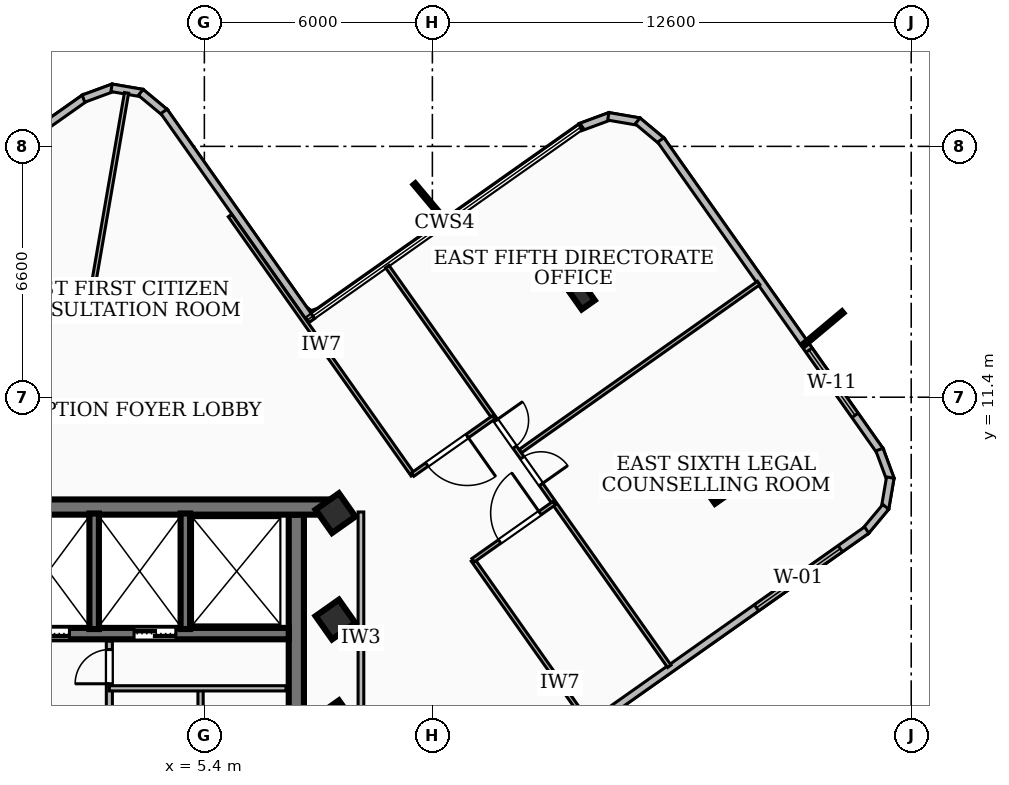
"""IFC4 building model, lengths in metres.
Left out: names, types, materials, properties, quantities, classifications, styles, units other than length and angle.
Written with IfcOpenShell. Run it as: python <this file> out.ifc"""

import sys

from ifc_helpers import new_model, si_unit, direction, frame, frame_2d, origin, origin_2d, place, context, subcontext, project, spatial, rectangle, i_section, extrude, element, fill, save


model = new_model("IFC4")
c1 = context("Model", 3, precision=1e-05, world=origin(), true_north=direction((0.0, 1.0)))
c2 = subcontext(c1, "Body", "Model", "MODEL_VIEW")
j1 = project(units=[si_unit("LENGTHUNIT", "METRE"), si_unit("PLANEANGLEUNIT", "RADIAN")], contexts=[c1])
p1 = place(None, origin())
s1 = spatial("IfcSite", under=j1, at=p1, CompositionType="ELEMENT")
p2 = place(p1, origin())
s2 = spatial("IfcBuilding", under=s1, at=p2, CompositionType="ELEMENT")
p3 = place(p2, frame((0.0, 0.0, 225.72)))
s3 = spatial("IfcBuildingStorey", under=s2, at=p3, CompositionType="ELEMENT", Elevation=225.72)
p4 = place(p3, frame((-8.78, 8.51, 0.0), z_axis=(0.0, 0.0, 1.0), x_axis=(1.0, 0.0, 0.0)))
e1 = element("IfcWall", 1, at=p4, inside=s3, PredefinedType="SHEAR", context=c2, shape_type="SweptSolid", body=[
    extrude(rectangle(XDim=17.56, YDim=0.4, at=frame_2d((8.78, 0.0))), origin(), (0.0, 0.0, 1.0), 3.14),
])
p5 = place(p3, frame((7.82, 8.31, 0.0), z_axis=(0.0, 0.0, 1.0), x_axis=(0.0, -1.0, 0.0)))
e2 = element("IfcWall", 2, at=p5, inside=s3, PredefinedType="SHEAR", context=c2, shape_type="SweptSolid", body=[
    extrude(rectangle(XDim=6.36, YDim=0.4, at=frame_2d((3.18, 0.0))), origin(), (0.0, 0.0, 1.0), 3.14),
])
p6 = place(p3, frame((7.62, 5.18, 0.0), z_axis=(0.0, 0.0, 1.0), x_axis=(-1.0, 0.0, 0.0)))
e3 = element("IfcWall", 3, at=p6, inside=s3, PredefinedType="SOLIDWALL", context=c2, shape_type="SweptSolid", body=[
    extrude(rectangle(XDim=15.24, YDim=0.3, at=frame_2d((7.62, 0.0))), origin(), (0.0, 0.0, 1.0), 3.14),
])
p7 = place(p6, frame((5.77, 0.0, 0.0)))
e4 = element("IfcOpeningElement", 4, at=p7, cuts=e3, PredefinedType="OPENING", context=c2, shape_type="SweptSolid", body=[
    extrude(rectangle(XDim=1.1, YDim=2.15, at=frame_2d((0.55, 1.075))), frame((0.0, 0.16, 0.0), z_axis=(0.0, -1.0, 0.0), x_axis=(1.0, 0.0, 0.0)), (0.0, 0.0, 1.0), 0.32),
])
p8 = place(p6, frame((2.97, 0.0, 0.0)))
e5 = element("IfcOpeningElement", 5, at=p8, cuts=e3, PredefinedType="OPENING", context=c2, shape_type="SweptSolid", body=[
    extrude(rectangle(XDim=1.1, YDim=2.15, at=frame_2d((0.55, 1.075))), frame((0.0, 0.16, 0.0), z_axis=(0.0, -1.0, 0.0), x_axis=(1.0, 0.0, 0.0)), (0.0, 0.0, 1.0), 0.32),
])
p9 = place(p6, frame((7.97, 0.0, 0.0)))
e6 = element("IfcOpeningElement", 6, at=p9, cuts=e3, PredefinedType="OPENING", context=c2, shape_type="SweptSolid", body=[
    extrude(rectangle(XDim=1.0, YDim=2.1, at=frame_2d((0.5, 1.05))), frame((0.0, 0.16, 0.0), z_axis=(0.0, -1.0, 0.0), x_axis=(1.0, 0.0, 0.0)), (0.0, 0.0, 1.0), 0.32),
])
for number, where, z_axis, x_axis in (
    (7, (2.5, 5.3, 0.0), (0.0, 0.0, 1.0), (0.0, 1.0, 0.0)),
    (8, (4.9, 5.3, 0.0), (0.0, 0.0, 1.0), (0.0, 1.0, 0.0)),
):
    element("IfcWall", number, at=place(p3, frame(where, z_axis=z_axis, x_axis=x_axis)), inside=s3, PredefinedType="SOLIDWALL", context=c2, shape_type="SweptSolid", body=[
        extrude(rectangle(XDim=3.04, YDim=0.25, at=frame_2d((1.52, 0.0))), origin(), (0.0, 0.0, 1.0), 3.14),
    ])
for number, where, z_axis, x_axis in (
    (9, (8.85, 2.9, 0.0), (0.0, 0.0, 1.0), (0.817, 0.576, 0.0)),
    (10, (8.85, 5.55, 0.0), (0.0, 0.0, 1.0), (0.817, 0.576, 0.0)),
    (11, (8.85, 8.35, 0.0), (0.0, 0.0, 1.0), (0.817, 0.576, 0.0)),
):
    element("IfcColumn", number, at=place(p3, frame(where, z_axis=z_axis, x_axis=x_axis)), inside=s3, PredefinedType="COLUMN", context=c2, shape_type="SweptSolid", body=[
        extrude(rectangle(XDim=0.75, YDim=0.75, at=origin_2d()), origin(), (0.0, 0.0, 1.0), 3.42),
    ])
for number, where, z_axis, x_axis in (
    (12, (18.741, 9.097, 0.0), (0.0, 0.0, 1.0), (0.817, 0.576, 0.0)),
    (13, (15.234, 14.209, 0.0), (0.0, 0.0, 1.0), (0.817, 0.576, 0.0)),
):
    element("IfcColumn", number, at=place(p3, frame(where, z_axis=z_axis, x_axis=x_axis)), inside=s3, PredefinedType="COLUMN", context=c2, shape_type="SweptSolid", body=[
        extrude(i_section(OverallWidth=0.418, OverallDepth=0.927, WebThickness=0.019, FlangeThickness=0.032, at=origin_2d()), origin(), (0.0, 0.0, 1.0), 3.42),
    ])
p10 = place(p3, frame((-2.919, 15.623, 0.0), z_axis=(0.0, 0.0, 1.0), x_axis=(0.817050016192, 0.576566796686, 0.0)))
e14 = element("IfcWall", 14, at=p10, inside=s3, PredefinedType="SOLIDWALL", context=c2, shape_type="SweptSolid", body=[
    extrude(rectangle(XDim=6.341, YDim=0.2, at=frame_2d((3.17, 0.0))), origin(), (0.0, 0.0, 1.0), 3.14),
])
p11 = place(p3, frame((2.219, 19.256, 0.0), z_axis=(0.0, 0.0, 1.0), x_axis=(0.938243551417, 0.345975487894, 0.0)))
e15 = element("IfcWall", 15, at=p11, inside=s3, PredefinedType="SOLIDWALL", context=c2, shape_type="SweptSolid", body=[
    extrude(rectangle(XDim=0.838, YDim=0.2, at=frame_2d((0.419, 0.0))), origin(), (0.0, 0.0, 1.0), 3.14),
])
p12 = place(p3, frame((2.957, 19.541, 0.0), z_axis=(0.0, 0.0, 1.0), x_axis=(0.985466949497, -0.169867275979, 0.0)))
e16 = element("IfcWall", 16, at=p12, inside=s3, PredefinedType="SOLIDWALL", context=c2, shape_type="SweptSolid", body=[
    extrude(rectangle(XDim=0.825, YDim=0.2, at=frame_2d((0.413, 0.0))), origin(), (0.0, 0.0, 1.0), 3.14),
])
p13 = place(p3, frame((3.726, 19.421, 0.0), z_axis=(0.0, 0.0, 1.0), x_axis=(0.768698761673, -0.639610986305, 0.0)))
e17 = element("IfcWall", 17, at=p13, inside=s3, PredefinedType="SOLIDWALL", context=c2, shape_type="SweptSolid", body=[
    extrude(rectangle(XDim=0.838, YDim=0.2, at=frame_2d((0.419, 0.0))), origin(), (0.0, 0.0, 1.0), 3.14),
])
p14 = place(p3, frame((4.337, 18.921, 0.0), z_axis=(0.0, 0.0, 1.0), x_axis=(0.576400163196, -0.817167578816, 0.0)))
e18 = element("IfcWall", 18, at=p14, inside=s3, PredefinedType="SOLIDWALL", context=c2, shape_type="SweptSolid", body=[
    extrude(rectangle(XDim=6.74, YDim=0.2, at=frame_2d((3.37, 0.0))), origin(), (0.0, 0.0, 1.0), 3.14),
])
p15 = place(p3, frame((15.292, 18.505, 0.0), z_axis=(0.0, 0.0, 1.0), x_axis=(0.938148911857, 0.346232030844, 0.0)))
e19 = element("IfcWall", 19, at=p15, inside=s3, PredefinedType="SOLIDWALL", context=c2, shape_type="SweptSolid", body=[
    extrude(rectangle(XDim=0.838, YDim=0.2, at=frame_2d((0.419, 0.0))), origin(), (0.0, 0.0, 1.0), 3.14),
])
p16 = place(p3, frame((16.03, 18.79, 0.0), z_axis=(0.0, 0.0, 1.0), x_axis=(0.985501046628, -0.16966934636, 0.0)))
e20 = element("IfcWall", 20, at=p16, inside=s3, PredefinedType="SOLIDWALL", context=c2, shape_type="SweptSolid", body=[
    extrude(rectangle(XDim=0.826, YDim=0.2, at=frame_2d((0.413, 0.0))), origin(), (0.0, 0.0, 1.0), 3.14),
])
p17 = place(p3, frame((16.8, 18.67, 0.0), z_axis=(0.0, 0.0, 1.0), x_axis=(0.767647650908, -0.640872127694, 0.0)))
e21 = element("IfcWall", 21, at=p17, inside=s3, PredefinedType="SOLIDWALL", context=c2, shape_type="SweptSolid", body=[
    extrude(rectangle(XDim=0.838, YDim=0.2, at=frame_2d((0.419, 0.0))), origin(), (0.0, 0.0, 1.0), 3.14),
])
p18 = place(p3, frame((17.41, 18.169, 0.0), z_axis=(0.0, 0.0, 1.0), x_axis=(0.576414426355, -0.817157517918, 0.0)))
e22 = element("IfcWall", 22, at=p18, inside=s3, PredefinedType="SOLIDWALL", context=c2, shape_type="SweptSolid", body=[
    extrude(rectangle(XDim=10.022, YDim=0.2, at=frame_2d((5.011, 0.0))), origin(), (0.0, 0.0, 1.0), 3.14),
])
p19 = place(p18, frame((6.768, 0.0, 0.85)))
e23 = element("IfcOpeningElement", 23, at=p19, cuts=e22, PredefinedType="OPENING", context=c2, shape_type="SweptSolid", body=[
    extrude(rectangle(XDim=2.1, YDim=1.6, at=frame_2d((1.05, 0.8))), frame((0.0, 0.11, 0.0), z_axis=(0.0, -1.0, 0.0), x_axis=(1.0, 0.0, 0.0)), (0.0, 0.0, 1.0), 0.22),
])
p20 = place(p3, frame((23.164, 10.022, 0.0), z_axis=(0.0, 0.0, 1.0), x_axis=(0.347637287427, -0.937629093187, 0.0)))
e24 = element("IfcWall", 24, at=p20, inside=s3, PredefinedType="SOLIDWALL", context=c2, shape_type="SweptSolid", body=[
    extrude(rectangle(XDim=0.837, YDim=0.2, at=frame_2d((0.418, 0.0))), origin(), (0.0, 0.0, 1.0), 3.14),
])
p21 = place(p3, frame((23.45, 9.285, 0.0), z_axis=(0.0, 0.0, 1.0), x_axis=(-0.169382242965, -0.985550432889, 0.0)))
e25 = element("IfcWall", 25, at=p21, inside=s3, PredefinedType="SOLIDWALL", context=c2, shape_type="SweptSolid", body=[
    extrude(rectangle(XDim=0.826, YDim=0.2, at=frame_2d((0.413, 0.0))), origin(), (0.0, 0.0, 1.0), 3.14),
])
p22 = place(p3, frame((23.33, 8.515, 0.0), z_axis=(0.0, 0.0, 1.0), x_axis=(-0.641187201728, -0.767384500977, 0.0)))
e26 = element("IfcWall", 26, at=p22, inside=s3, PredefinedType="SOLIDWALL", context=c2, shape_type="SweptSolid", body=[
    extrude(rectangle(XDim=0.838, YDim=0.2, at=frame_2d((0.419, 0.0))), origin(), (0.0, 0.0, 1.0), 3.14),
])
p23 = place(p3, frame((22.829, 7.905, 0.0), z_axis=(0.0, 0.0, 1.0), x_axis=(-0.817135410946, -0.576445765166, 0.0)))
e27 = element("IfcWall", 27, at=p23, inside=s3, PredefinedType="SOLIDWALL", context=c2, shape_type="SweptSolid", body=[
    extrude(rectangle(XDim=8.842, YDim=0.2, at=frame_2d((4.421, 0.0))), origin(), (0.0, 0.0, 1.0), 3.14),
])
p24 = place(p23, frame((0.85, 0.0, 0.85)))
e28 = element("IfcOpeningElement", 28, at=p24, cuts=e27, PredefinedType="OPENING", context=c2, shape_type="SweptSolid", body=[
    extrude(rectangle(XDim=2.7, YDim=2.1, at=frame_2d((1.35, 1.05))), frame((0.0, 0.11, 0.0), z_axis=(0.0, -1.0, 0.0), x_axis=(1.0, 0.0, 0.0)), (0.0, 0.0, 1.0), 0.22),
])
p25 = place(p3, frame((2.9, 2.04, 0.0), z_axis=(0.0, 0.0, 1.0), x_axis=(0.0, 1.0, 0.0)))
e29 = element("IfcWall", 29, at=p25, inside=s3, PredefinedType="PARTITIONING", context=c2, shape_type="SweptSolid", body=[
    extrude(rectangle(XDim=2.94, YDim=0.16, at=frame_2d((1.47, 0.0))), origin(), (0.0, 0.0, 1.0), 2.37),
])
p26 = place(p25, frame((1.82, 0.0, 0.0)))
e30 = element("IfcOpeningElement", 30, at=p26, cuts=e29, PredefinedType="OPENING", context=c2, shape_type="SweptSolid", body=[
    extrude(rectangle(XDim=0.9, YDim=2.06, at=frame_2d((0.45, 1.03))), frame((0.0, 0.09, 0.0), z_axis=(0.0, -1.0, 0.0), x_axis=(1.0, 0.0, 0.0)), (0.0, 0.0, 1.0), 0.18),
])
p27 = place(p3, frame((2.9, 3.74, 0.0), z_axis=(0.0, 0.0, 1.0), x_axis=(1.0, 0.0, 0.0)))
e31 = element("IfcWall", 31, at=p27, inside=s3, PredefinedType="PARTITIONING", context=c2, shape_type="SweptSolid", body=[
    extrude(rectangle(XDim=4.65, YDim=0.138, at=frame_2d((2.325, 0.0))), origin(), (0.0, 0.0, 1.0), 3.14),
])
p28 = place(p3, frame((5.3, 1.85, 0.0), z_axis=(0.0, 0.0, 1.0), x_axis=(0.0, 1.0, 0.0)))
e32 = element("IfcWall", 32, at=p28, inside=s3, PredefinedType="PARTITIONING", context=c2, shape_type="SweptSolid", body=[
    extrude(rectangle(XDim=1.89, YDim=0.138, at=frame_2d((0.945, 0.0))), origin(), (0.0, 0.0, 1.0), 2.37),
])
p29 = place(p3, frame((9.52, 1.75, 0.0), z_axis=(0.0, 0.0, 1.0), x_axis=(0.0, 1.0, 0.0)))
e33 = element("IfcWall", 33, at=p29, inside=s3, PredefinedType="PARTITIONING", context=c2, shape_type="SweptSolid", body=[
    extrude(rectangle(XDim=6.63, YDim=0.15, at=frame_2d((3.315, 0.0))), origin(), (0.0, 0.0, 1.0), 2.51),
])
p30 = place(p3, frame((2.338, 13.54, 0.0), z_axis=(0.0, 0.0, 1.0), x_axis=(0.1703339471, 0.9853863945, 0.0)))
e34 = element("IfcWall", 34, at=p30, inside=s3, PredefinedType="PARTITIONING", context=c2, shape_type="SweptSolid", body=[
    extrude(rectangle(XDim=5.954, YDim=0.11, at=frame_2d((2.977, 0.0))), origin(), (0.0, 0.0, 1.0), 3.14),
])
p31 = place(p3, frame((10.887, 9.357, 0.0), z_axis=(0.0, 0.0, 1.0), x_axis=(-0.576423728743, 0.817150956031, 0.0)))
e35 = element("IfcWall", 35, at=p31, inside=s3, PredefinedType="PARTITIONING", context=c2, shape_type="SweptSolid", body=[
    extrude(rectangle(XDim=8.35, YDim=0.11, at=frame_2d((4.175, 0.0))), origin(), (0.0, 0.0, 1.0), 2.51),
])
p32 = place(p3, frame((17.049, 0.621, 0.0), z_axis=(0.0, 0.0, 1.0), x_axis=(-0.57635038395, 0.817202689007, 0.0)))
e36 = element("IfcWall", 36, at=p32, inside=s3, PredefinedType="PARTITIONING", context=c2, shape_type="SweptSolid", body=[
    extrude(rectangle(XDim=7.95, YDim=0.11, at=frame_2d((3.975, 0.0))), origin(), (0.0, 0.0, 1.0), 3.14),
])
p33 = place(p3, frame((13.014, 10.869, 0.0), z_axis=(0.0, 0.0, 1.0), x_axis=(-0.817133808286, -0.576448036995, 0.0)))
e37 = element("IfcWall", 37, at=p33, inside=s3, PredefinedType="PARTITIONING", context=c2, shape_type="SweptSolid", body=[
    extrude(rectangle(XDim=2.609, YDim=0.11, at=frame_2d((1.304, 0.0))), origin(), (0.0, 0.0, 1.0), 3.14),
])
p34 = place(p33, frame((0.854, 0.0, 0.0)))
e38 = element("IfcOpeningElement", 38, at=p34, cuts=e37, PredefinedType="OPENING", context=c2, shape_type="SweptSolid", body=[
    extrude(rectangle(XDim=1.3, YDim=2.1, at=frame_2d((0.65, 1.05))), frame((0.0, 0.065, 0.0), z_axis=(0.0, -1.0, 0.0), x_axis=(1.0, 0.0, 0.0)), (0.0, 0.0, 1.0), 0.13),
])
p35 = place(p3, frame((12.472, 7.11, 0.0), z_axis=(0.0, 0.0, 1.0), x_axis=(0.81728919746, 0.576227704745, 0.0)))
e39 = element("IfcWall", 39, at=p35, inside=s3, PredefinedType="PARTITIONING", context=c2, shape_type="SweptSolid", body=[
    extrude(rectangle(XDim=2.61, YDim=0.11, at=frame_2d((1.305, 0.0))), origin(), (0.0, 0.0, 1.0), 3.14),
])
p36 = place(p35, frame((0.855, 0.0, 0.0)))
e40 = element("IfcOpeningElement", 40, at=p36, cuts=e39, PredefinedType="OPENING", context=c2, shape_type="SweptSolid", body=[
    extrude(rectangle(XDim=1.3, YDim=2.1, at=frame_2d((0.65, 1.05))), frame((0.0, 0.065, 0.0), z_axis=(0.0, -1.0, 0.0), x_axis=(1.0, 0.0, 0.0)), (0.0, 0.0, 1.0), 0.13),
])
p37 = place(p3, frame((13.715, 9.981, 0.0), z_axis=(0.0, 0.0, 1.0), x_axis=(0.817122118381, 0.576464607459, 0.0)))
e41 = element("IfcWall", 41, at=p37, inside=s3, PredefinedType="PARTITIONING", context=c2, shape_type="SweptSolid", body=[
    extrude(rectangle(XDim=7.675, YDim=0.11, at=frame_2d((3.837, 0.0))), origin(), (0.0, 0.0, 1.0), 3.14),
])
p38 = place(p3, frame((10.215, 14.836, 0.0), z_axis=(0.0, 0.0, 1.0), x_axis=(0.576525296339, -0.817079300118, 0.0)))
e42 = element("IfcWall", 42, at=p38, inside=s3, PredefinedType="PARTITIONING", context=c2, shape_type="SweptSolid", body=[
    extrude(rectangle(XDim=12.87, YDim=0.11, at=frame_2d((6.435, 0.0))), origin(), (0.0, 0.0, 1.0), 2.51),
])
p39 = place(p38, frame((6.155, 0.0, 0.0)))
e43 = element("IfcOpeningElement", 43, at=p39, cuts=e42, PredefinedType="OPENING", context=c2, shape_type="SweptSolid", body=[
    extrude(rectangle(XDim=0.86, YDim=2.04, at=frame_2d((0.43, 1.02))), frame((0.0, 0.065, 0.0), z_axis=(0.0, -1.0, 0.0), x_axis=(1.0, 0.0, 0.0)), (0.0, 0.0, 1.0), 0.13),
])
p40 = place(p38, frame((4.955, 0.0, 0.0)))
e44 = element("IfcOpeningElement", 44, at=p40, cuts=e42, PredefinedType="OPENING", context=c2, shape_type="SweptSolid", body=[
    extrude(rectangle(XDim=0.86, YDim=2.04, at=frame_2d((0.43, 1.02))), frame((0.0, 0.065, 0.0), z_axis=(0.0, -1.0, 0.0), x_axis=(1.0, 0.0, 0.0)), (0.0, 0.0, 1.0), 0.13),
])
p41 = place(p19, origin())
e45 = element("IfcWindow", 45, at=p41, inside=s3, PartitioningType="SINGLE_PANEL", PredefinedType="WINDOW", context=c2, shape_type="SweptSolid", body=[
    extrude(rectangle(XDim=2.1, YDim=1.6, at=frame_2d((1.05, 0.8))), frame((0.0, 0.03, 0.0), z_axis=(0.0, -1.0, 0.0), x_axis=(1.0, 0.0, 0.0)), (0.0, 0.0, 1.0), 0.06),
])
fill(e23, e45)
p42 = place(p24, origin())
e46 = element("IfcWindow", 46, at=p42, inside=s3, PartitioningType="SINGLE_PANEL", PredefinedType="WINDOW", context=c2, shape_type="SweptSolid", body=[
    extrude(rectangle(XDim=2.7, YDim=2.1, at=frame_2d((1.35, 1.05))), frame((0.0, 0.03, 0.0), z_axis=(0.0, -1.0, 0.0), x_axis=(1.0, 0.0, 0.0)), (0.0, 0.0, 1.0), 0.06),
])
fill(e28, e46)
p43 = place(p7, origin())
e47 = element("IfcDoor", 47, at=p43, inside=s3, OperationType="DOUBLE_DOOR_SLIDING", PredefinedType="DOOR", context=c2, shape_type="SweptSolid", body=[
    extrude(rectangle(XDim=1.1, YDim=2.15, at=frame_2d((0.55, 1.075))), frame((0.0, 0.025, 0.0), z_axis=(0.0, -1.0, 0.0), x_axis=(1.0, 0.0, 0.0)), (0.0, 0.0, 1.0), 0.05),
])
fill(e4, e47)
p44 = place(p8, origin())
e48 = element("IfcDoor", 48, at=p44, inside=s3, OperationType="DOUBLE_DOOR_SLIDING", PredefinedType="DOOR", context=c2, shape_type="SweptSolid", body=[
    extrude(rectangle(XDim=1.1, YDim=2.15, at=frame_2d((0.55, 1.075))), frame((0.0, 0.025, 0.0), z_axis=(0.0, -1.0, 0.0), x_axis=(1.0, 0.0, 0.0)), (0.0, 0.0, 1.0), 0.05),
])
fill(e5, e48)
p45 = place(p26, origin())
e49 = element("IfcDoor", 49, at=p45, inside=s3, OperationType="SINGLE_SWING_LEFT", PredefinedType="DOOR", context=c2, shape_type="SweptSolid", body=[
    extrude(rectangle(XDim=0.9, YDim=2.06, at=frame_2d((0.45, 1.03))), frame((0.0, 0.025, 0.0), z_axis=(0.0, -1.0, 0.0), x_axis=(1.0, 0.0, 0.0)), (0.0, 0.0, 1.0), 0.05),
])
fill(e30, e49)
p46 = place(p34, origin())
e50 = element("IfcDoor", 50, at=p46, inside=s3, OperationType="SINGLE_SWING_LEFT", PredefinedType="DOOR", context=c2, shape_type="SweptSolid", body=[
    extrude(rectangle(XDim=1.3, YDim=2.1, at=frame_2d((0.65, 1.05))), frame((0.0, 0.025, 0.0), z_axis=(0.0, -1.0, 0.0), x_axis=(1.0, 0.0, 0.0)), (0.0, 0.0, 1.0), 0.05),
])
fill(e38, e50)
p47 = place(p36, origin())
e51 = element("IfcDoor", 51, at=p47, inside=s3, OperationType="SINGLE_SWING_RIGHT", PredefinedType="DOOR", context=c2, shape_type="SweptSolid", body=[
    extrude(rectangle(XDim=1.3, YDim=2.1, at=frame_2d((0.65, 1.05))), frame((0.0, 0.025, 0.0), z_axis=(0.0, -1.0, 0.0), x_axis=(1.0, 0.0, 0.0)), (0.0, 0.0, 1.0), 0.05),
])
fill(e40, e51)
p48 = place(p39, origin())
e52 = element("IfcDoor", 52, at=p48, inside=s3, OperationType="SINGLE_SWING_RIGHT", PredefinedType="DOOR", context=c2, shape_type="SweptSolid", body=[
    extrude(rectangle(XDim=0.86, YDim=2.04, at=frame_2d((0.43, 1.02))), frame((0.0, 0.025, 0.0), z_axis=(0.0, -1.0, 0.0), x_axis=(1.0, 0.0, 0.0)), (0.0, 0.0, 1.0), 0.05),
])
fill(e43, e52)
p49 = place(p40, origin())
e53 = element("IfcDoor", 53, at=p49, inside=s3, OperationType="SINGLE_SWING_LEFT", PredefinedType="DOOR", context=c2, shape_type="SweptSolid", body=[
    extrude(rectangle(XDim=0.86, YDim=2.04, at=frame_2d((0.43, 1.02))), frame((0.0, 0.025, 0.0), z_axis=(0.0, -1.0, 0.0), x_axis=(1.0, 0.0, 0.0)), (0.0, 0.0, 1.0), 0.05),
])
fill(e44, e53)
save(model, sys.argv[1])
